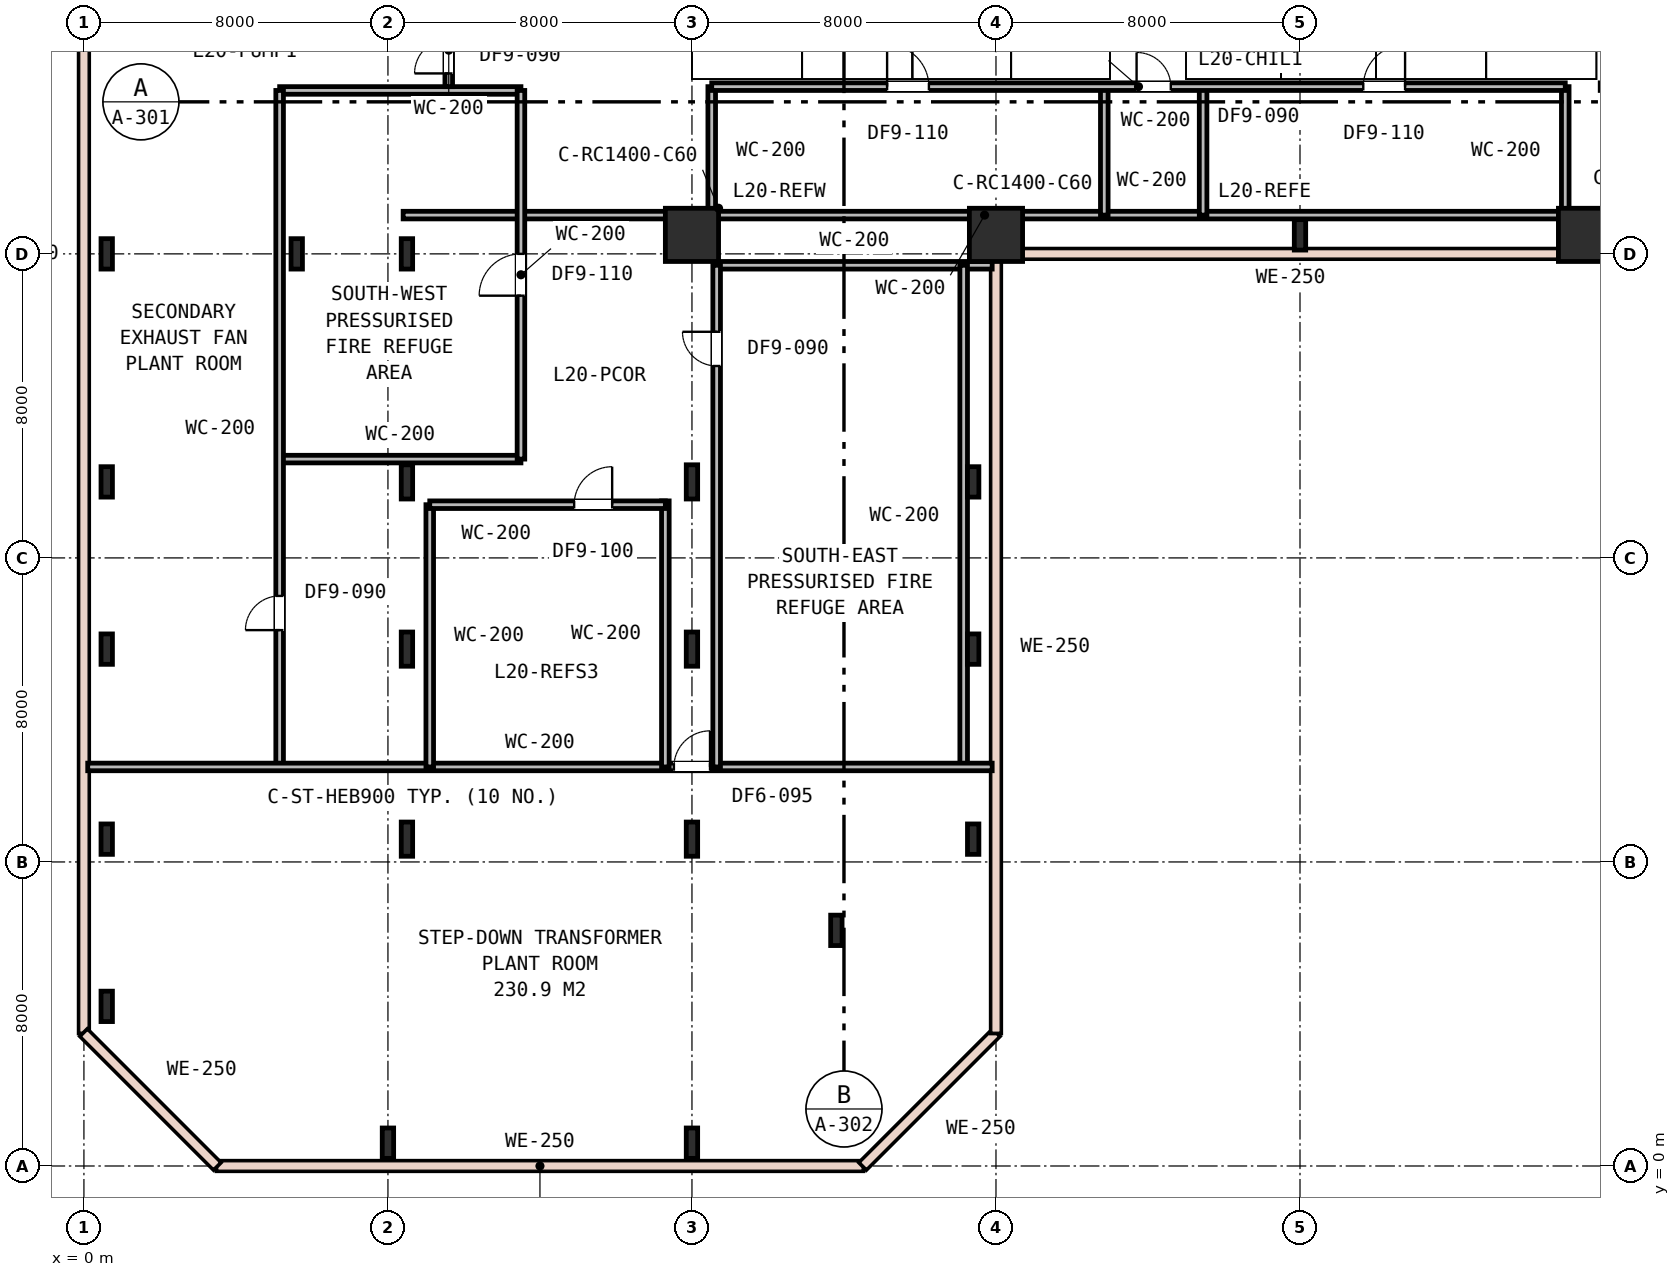
"""IFC4 building model, lengths in metres.
Left out: names, types, materials, properties, quantities, classifications, styles, units other than length and angle.
Written with IfcOpenShell. Run it as: python <this file> out.ifc"""

import sys

from ifc_helpers import new_model, si_unit, direction, frame, frame_2d, origin, origin_2d, place, context, subcontext, project, spatial, rectangle, i_section, extrude, element, fill, save


model = new_model("IFC4")
c1 = context("Model", 3, precision=1e-05, world=origin(), true_north=direction((0.0, 1.0)))
c2 = subcontext(c1, "Body", "Model", "MODEL_VIEW")
j1 = project(units=[si_unit("LENGTHUNIT", "METRE"), si_unit("PLANEANGLEUNIT", "RADIAN")], contexts=[c1])
p1 = place(None, origin())
s1 = spatial("IfcSite", under=j1, at=p1, CompositionType="ELEMENT")
p2 = place(p1, origin())
s2 = spatial("IfcBuilding", under=s1, at=p2, CompositionType="ELEMENT")
p3 = place(p2, frame((0.0, 0.0, 79.8)))
s3 = spatial("IfcBuildingStorey", under=s2, at=p3, CompositionType="ELEMENT", Elevation=79.8)
p4 = place(p3, frame((8.5, 24.0, 0.0), z_axis=(0.0, 0.0, 1.0), x_axis=(1.0, 0.0, 0.0)))
e1 = element("IfcColumn", 1, at=p4, inside=s3, PredefinedType="COLUMN", context=c2, shape_type="SweptSolid", body=[
    extrude(i_section(OverallWidth=0.3, OverallDepth=0.8, WebThickness=0.018, FlangeThickness=0.033, FilletRadius=0.03, at=origin_2d()), origin(), (0.0, 0.0, 1.0), 4.8),
])
for number, where, z_axis, x_axis in (
    (2, (16.0, 24.5, 0.0), (0.0, 0.0, 1.0), (1.0, 0.0, 0.0)),
    (3, (24.0, 24.5, 0.0), (0.0, 0.0, 1.0), (1.0, 0.0, 0.0)),
):
    element("IfcColumn", number, at=place(p3, frame(where, z_axis=z_axis, x_axis=x_axis)), inside=s3, PredefinedType="COLUMN", context=c2, shape_type="SweptSolid", body=[
        extrude(rectangle(XDim=1.4, YDim=1.4, at=origin_2d()), origin(), (0.0, 0.0, 1.0), 4.8),
    ])
p5 = place(p3, frame((32.0, 24.5, 0.0), z_axis=(0.0, 0.0, 1.0), x_axis=(1.0, 0.0, 0.0)))
e4 = element("IfcColumn", 4, at=p5, inside=s3, PredefinedType="COLUMN", context=c2, shape_type="SweptSolid", body=[
    extrude(i_section(OverallWidth=0.3, OverallDepth=0.8, WebThickness=0.018, FlangeThickness=0.033, FilletRadius=0.03, at=origin_2d()), origin(), (0.0, 0.0, 1.0), 4.8),
])
p6 = place(p3, frame((39.5, 24.5, 0.0), z_axis=(0.0, 0.0, 1.0), x_axis=(1.0, 0.0, 0.0)))
e5 = element("IfcColumn", 5, at=p6, inside=s3, PredefinedType="COLUMN", context=c2, shape_type="SweptSolid", body=[
    extrude(rectangle(XDim=1.4, YDim=1.4, at=origin_2d()), origin(), (0.0, 0.0, 1.0), 4.8),
])
for number, where, z_axis, x_axis in (
    (6, (5.6, 24.0, 0.0), (0.0, 0.0, 1.0), (1.0, 0.0, 0.0)),
    (7, (0.6, 24.0, 0.0), (0.0, 0.0, 1.0), (1.0, 0.0, 0.0)),
    (8, (0.6, 8.6, 0.0), (0.0, 0.0, 1.0), (1.0, 0.0, 0.0)),
    (9, (0.6, 13.6, 0.0), (0.0, 0.0, 1.0), (1.0, 0.0, 0.0)),
    (10, (0.6, 18.0, 0.0), (0.0, 0.0, 1.0), (1.0, 0.0, 0.0)),
    (11, (0.6, 4.2, 0.0), (0.0, 0.0, 1.0), (1.0, 0.0, 0.0)),
):
    element("IfcColumn", number, at=place(p3, frame(where, z_axis=z_axis, x_axis=x_axis)), inside=s3, PredefinedType="COLUMN", context=c2, shape_type="SweptSolid", body=[
        extrude(i_section(OverallWidth=0.3, OverallDepth=0.8, WebThickness=0.018, FlangeThickness=0.033, FilletRadius=0.03, at=origin_2d()), origin(), (0.0, 0.0, 1.0), 4.8),
    ])
for number, where, z_axis, x_axis in (
    (12, (8.0, 0.6, 0.0), (0.0, 0.0, 1.0), (1.0, 0.0, 0.0)),
    (13, (16.0, 0.6, 0.0), (0.0, 0.0, 1.0), (1.0, 0.0, 0.0)),
):
    element("IfcColumn", number, at=place(p3, frame(where, z_axis=z_axis, x_axis=x_axis)), inside=s3, PredefinedType="COLUMN", context=c2, shape_type="SweptSolid", body=[
        extrude(i_section(OverallWidth=0.3, OverallDepth=0.8, WebThickness=0.018, FlangeThickness=0.033, FilletRadius=0.03, at=origin_2d()), origin(), (0.0, 0.0, 1.0), 4.05),
    ])
for number, where, z_axis, x_axis in (
    (14, (19.8, 6.2, 0.0), (0.0, 0.0, 1.0), (1.0, 0.0, 0.0)),
    (15, (23.4, 8.6, 0.0), (0.0, 0.0, 1.0), (1.0, 0.0, 0.0)),
    (16, (23.4, 13.6, 0.0), (0.0, 0.0, 1.0), (1.0, 0.0, 0.0)),
    (17, (23.4, 18.0, 0.0), (0.0, 0.0, 1.0), (1.0, 0.0, 0.0)),
):
    element("IfcColumn", number, at=place(p3, frame(where, z_axis=z_axis, x_axis=x_axis)), inside=s3, PredefinedType="COLUMN", context=c2, shape_type="SweptSolid", body=[
        extrude(i_section(OverallWidth=0.3, OverallDepth=0.8, WebThickness=0.018, FlangeThickness=0.033, FilletRadius=0.03, at=origin_2d()), origin(), (0.0, 0.0, 1.0), 4.8),
    ])
for number, where, z_axis, x_axis in (
    (18, (8.5, 8.6, 0.0), (0.0, 0.0, 1.0), (1.0, 0.0, 0.0)),
    (19, (16.0, 8.6, 0.0), (0.0, 0.0, 1.0), (1.0, 0.0, 0.0)),
    (20, (8.5, 13.6, 0.0), (0.0, 0.0, 1.0), (1.0, 0.0, 0.0)),
    (21, (16.0, 13.6, 0.0), (0.0, 0.0, 1.0), (1.0, 0.0, 0.0)),
    (22, (8.5, 18.0, 0.0), (0.0, 0.0, 1.0), (1.0, 0.0, 0.0)),
    (23, (16.0, 18.0, 0.0), (0.0, 0.0, 1.0), (1.0, 0.0, 0.0)),
):
    element("IfcColumn", number, at=place(p3, frame(where, z_axis=z_axis, x_axis=x_axis)), inside=s3, PredefinedType="COLUMN", context=c2, shape_type="SweptSolid", body=[
        extrude(i_section(OverallWidth=0.3, OverallDepth=0.9, WebThickness=0.018, FlangeThickness=0.035, FilletRadius=0.03, at=origin_2d()), origin(), (0.0, 0.0, 1.0), 4.8),
    ])
p7 = place(p3, frame((3.5, 0.0, 0.0), z_axis=(0.0, 0.0, 1.0), x_axis=(1.0, 0.0, 0.0)))
e24 = element("IfcWall", 24, at=p7, inside=s3, PredefinedType="STANDARD", context=c2, shape_type="SweptSolid", body=[
    extrude(rectangle(XDim=17.0, YDim=0.25, at=frame_2d((8.5, 0.0))), origin(), (0.0, 0.0, 1.0), 1.15),
])
p8 = place(p3, frame((20.5, 0.0, 0.0), z_axis=(0.0, 0.0, 1.0), x_axis=(0.707106781187, 0.707106781187, 0.0)))
e25 = element("IfcWall", 25, at=p8, inside=s3, PredefinedType="STANDARD", context=c2, shape_type="SweptSolid", body=[
    extrude(rectangle(XDim=4.95, YDim=0.25, at=frame_2d((2.475, 0.0))), origin(), (0.0, 0.0, 1.0), 1.15),
])
p9 = place(p3, frame((24.0, 3.5, 0.0), z_axis=(0.0, 0.0, 1.0), x_axis=(0.0, 1.0, 0.0)))
e26 = element("IfcWall", 26, at=p9, inside=s3, PredefinedType="STANDARD", context=c2, shape_type="SweptSolid", body=[
    extrude(rectangle(XDim=20.3, YDim=0.25, at=frame_2d((10.15, 0.0))), origin(), (0.0, 0.0, 1.0), 1.15),
])
p10 = place(p3, frame((24.7, 24.0, 0.0), z_axis=(0.0, 0.0, 1.0), x_axis=(1.0, 0.0, 0.0)))
e27 = element("IfcWall", 27, at=p10, inside=s3, PredefinedType="STANDARD", context=c2, shape_type="SweptSolid", body=[
    extrude(rectangle(XDim=14.1, YDim=0.25, at=frame_2d((7.05, 0.0))), origin(), (0.0, 0.0, 1.0), 1.15),
])
p11 = place(p3, frame((0.0, 44.5, 0.0), z_axis=(0.0, 0.0, 1.0), x_axis=(0.0, -1.0, 0.0)))
e28 = element("IfcWall", 28, at=p11, inside=s3, PredefinedType="STANDARD", context=c2, shape_type="SweptSolid", body=[
    extrude(rectangle(XDim=41.0, YDim=0.25, at=frame_2d((20.5, 0.0))), origin(), (0.0, 0.0, 1.0), 1.15),
])
p12 = place(p3, frame((0.0, 3.5, 0.0), z_axis=(0.0, 0.0, 1.0), x_axis=(0.707106781187, -0.707106781187, 0.0)))
e29 = element("IfcWall", 29, at=p12, inside=s3, PredefinedType="STANDARD", context=c2, shape_type="SweptSolid", body=[
    extrude(rectangle(XDim=4.95, YDim=0.25, at=frame_2d((2.475, 0.0))), origin(), (0.0, 0.0, 1.0), 1.15),
])
p13 = place(p3, frame((8.4, 25.02, 0.0), z_axis=(0.0, 0.0, 1.0), x_axis=(1.0, 0.0, 0.0)))
e30 = element("IfcWall", 30, at=p13, inside=s3, PredefinedType="PARTITIONING", context=c2, shape_type="SweptSolid", body=[
    extrude(rectangle(XDim=30.6, YDim=0.2, at=frame_2d((15.3, 0.0))), origin(), (0.0, 0.0, 1.0), 3.94),
])
for number, where, z_axis, x_axis in (
    (31, (16.52, 25.02, 0.0), (0.0, 0.0, 1.0), (0.0, 1.0, 0.0)),
    (32, (38.98, 25.02, 0.0), (0.0, 0.0, 1.0), (0.0, 1.0, 0.0)),
):
    element("IfcWall", number, at=place(p3, frame(where, z_axis=z_axis, x_axis=x_axis)), inside=s3, PredefinedType="PARTITIONING", context=c2, shape_type="SweptSolid", body=[
        extrude(rectangle(XDim=3.38, YDim=0.2, at=frame_2d((1.69, 0.0))), origin(), (0.0, 0.0, 1.0), 3.94),
    ])
for number, where, z_axis, x_axis in (
    (33, (26.85, 25.02, 0.0), (0.0, 0.0, 1.0), (0.0, 1.0, 0.0)),
    (34, (29.45, 25.02, 0.0), (0.0, 0.0, 1.0), (0.0, 1.0, 0.0)),
):
    element("IfcWall", number, at=place(p3, frame(where, z_axis=z_axis, x_axis=x_axis)), inside=s3, PredefinedType="PARTITIONING", context=c2, shape_type="SweptSolid", body=[
        extrude(rectangle(XDim=3.38, YDim=0.2, at=frame_2d((1.69, 0.0))), origin(), (0.0, 0.0, 1.0), 4.02),
    ])
p14 = place(p3, frame((16.52, 28.4, 0.0), z_axis=(0.0, 0.0, 1.0), x_axis=(1.0, 0.0, 0.0)))
e35 = element("IfcWall", 35, at=p14, inside=s3, PredefinedType="PARTITIONING", context=c2, shape_type="SweptSolid", body=[
    extrude(rectangle(XDim=22.46, YDim=0.2, at=frame_2d((11.23, 0.0))), origin(), (0.0, 0.0, 1.0), 3.94),
])
p15 = place(p14, frame((4.615, 0.0, 0.0)))
e36 = element("IfcOpeningElement", 36, at=p15, cuts=e35, PredefinedType="OPENING", context=c2, shape_type="SweptSolid", body=[
    extrude(rectangle(XDim=1.1, YDim=2.15, at=frame_2d((0.55, 1.075))), frame((0.0, 0.11, 0.0), z_axis=(0.0, -1.0, 0.0), x_axis=(1.0, 0.0, 0.0)), (0.0, 0.0, 1.0), 0.22),
])
p16 = place(p14, frame((11.18, 0.0, 0.0)))
e37 = element("IfcOpeningElement", 37, at=p16, cuts=e35, PredefinedType="OPENING", context=c2, shape_type="SweptSolid", body=[
    extrude(rectangle(XDim=0.9, YDim=2.15, at=frame_2d((0.45, 1.075))), frame((0.0, 0.11, 0.0), z_axis=(0.0, -1.0, 0.0), x_axis=(1.0, 0.0, 0.0)), (0.0, 0.0, 1.0), 0.22),
])
p17 = place(p14, frame((17.145, 0.0, 0.0)))
e38 = element("IfcOpeningElement", 38, at=p17, cuts=e35, PredefinedType="OPENING", context=c2, shape_type="SweptSolid", body=[
    extrude(rectangle(XDim=1.1, YDim=2.15, at=frame_2d((0.55, 1.075))), frame((0.0, 0.11, 0.0), z_axis=(0.0, -1.0, 0.0), x_axis=(1.0, 0.0, 0.0)), (0.0, 0.0, 1.0), 0.22),
])
for number, where, z_axis, x_axis in (
    (39, (5.15, 28.3, 0.0), (0.0, 0.0, 1.0), (1.0, 0.0, 0.0)),
    (40, (5.15, 18.6, 0.0), (0.0, 0.0, 1.0), (1.0, 0.0, 0.0)),
):
    element("IfcWall", number, at=place(p3, frame(where, z_axis=z_axis, x_axis=x_axis)), inside=s3, PredefinedType="PARTITIONING", context=c2, shape_type="SweptSolid", body=[
        extrude(rectangle(XDim=6.35, YDim=0.2, at=frame_2d((3.175, 0.0))), origin(), (0.0, 0.0, 1.0), 3.94),
    ])
p18 = place(p3, frame((5.15, 10.5, 0.0), z_axis=(0.0, 0.0, 1.0), x_axis=(0.0, 1.0, 0.0)))
e41 = element("IfcWall", 41, at=p18, inside=s3, PredefinedType="PARTITIONING", context=c2, shape_type="SweptSolid", body=[
    extrude(rectangle(XDim=17.8, YDim=0.2, at=frame_2d((8.9, 0.0))), origin(), (0.0, 0.0, 1.0), 3.94),
])
p19 = place(p18, frame((3.6, 0.0, 0.0)))
e42 = element("IfcOpeningElement", 42, at=p19, cuts=e41, PredefinedType="OPENING", context=c2, shape_type="SweptSolid", body=[
    extrude(rectangle(XDim=0.9, YDim=2.15, at=frame_2d((0.45, 1.075))), frame((0.0, 0.11, 0.0), z_axis=(0.0, -1.0, 0.0), x_axis=(1.0, 0.0, 0.0)), (0.0, 0.0, 1.0), 0.22),
])
p20 = place(p3, frame((11.5, 18.6, 0.0), z_axis=(0.0, 0.0, 1.0), x_axis=(0.0, 1.0, 0.0)))
e43 = element("IfcWall", 43, at=p20, inside=s3, PredefinedType="PARTITIONING", context=c2, shape_type="SweptSolid", body=[
    extrude(rectangle(XDim=9.7, YDim=0.2, at=frame_2d((4.85, 0.0))), origin(), (0.0, 0.0, 1.0), 3.94),
])
p21 = place(p20, frame((4.3, 0.0, 0.0)))
e44 = element("IfcOpeningElement", 44, at=p21, cuts=e43, PredefinedType="OPENING", context=c2, shape_type="SweptSolid", body=[
    extrude(rectangle(XDim=1.1, YDim=2.15, at=frame_2d((0.55, 1.075))), frame((0.0, 0.11, 0.0), z_axis=(0.0, -1.0, 0.0), x_axis=(1.0, 0.0, 0.0)), (0.0, 0.0, 1.0), 0.22),
])
p22 = place(p3, frame((16.65, 23.7, 0.0), z_axis=(0.0, 0.0, 1.0), x_axis=(1.0, 0.0, 0.0)))
e45 = element("IfcWall", 45, at=p22, inside=s3, PredefinedType="PARTITIONING", context=c2, shape_type="SweptSolid", body=[
    extrude(rectangle(XDim=7.25, YDim=0.2, at=frame_2d((3.625, 0.0))), origin(), (0.0, 0.0, 1.0), 4.02),
])
p23 = place(p3, frame((23.15, 10.5, 0.0), z_axis=(0.0, 0.0, 1.0), x_axis=(0.0, 1.0, 0.0)))
e46 = element("IfcWall", 46, at=p23, inside=s3, PredefinedType="PARTITIONING", context=c2, shape_type="SweptSolid", body=[
    extrude(rectangle(XDim=13.2, YDim=0.2, at=frame_2d((6.6, 0.0))), origin(), (0.0, 0.0, 1.0), 3.94),
])
p24 = place(p3, frame((0.1, 10.5, 0.0), z_axis=(0.0, 0.0, 1.0), x_axis=(1.0, 0.0, 0.0)))
e47 = element("IfcWall", 47, at=p24, inside=s3, PredefinedType="PARTITIONING", context=c2, shape_type="SweptSolid", body=[
    extrude(rectangle(XDim=23.8, YDim=0.2, at=frame_2d((11.9, 0.0))), origin(), (0.0, 0.0, 1.0), 3.94),
])
p25 = place(p24, frame((15.425, 0.0, 0.0)))
e48 = element("IfcOpeningElement", 48, at=p25, cuts=e47, PredefinedType="OPENING", context=c2, shape_type="SweptSolid", body=[
    extrude(rectangle(XDim=0.95, YDim=2.15, at=frame_2d((0.475, 1.075))), frame((0.0, 0.11, 0.0), z_axis=(0.0, -1.0, 0.0), x_axis=(1.0, 0.0, 0.0)), (0.0, 0.0, 1.0), 0.22),
])
p26 = place(p3, frame((16.65, 10.5, 0.0), z_axis=(0.0, 0.0, 1.0), x_axis=(0.0, 1.0, 0.0)))
e49 = element("IfcWall", 49, at=p26, inside=s3, PredefinedType="PARTITIONING", context=c2, shape_type="SweptSolid", body=[
    extrude(rectangle(XDim=13.2, YDim=0.2, at=frame_2d((6.6, 0.0))), origin(), (0.0, 0.0, 1.0), 3.94),
])
p27 = place(p26, frame((10.55, 0.0, 0.0)))
e50 = element("IfcOpeningElement", 50, at=p27, cuts=e49, PredefinedType="OPENING", context=c2, shape_type="SweptSolid", body=[
    extrude(rectangle(XDim=0.9, YDim=2.15, at=frame_2d((0.45, 1.075))), frame((0.0, 0.11, 0.0), z_axis=(0.0, -1.0, 0.0), x_axis=(1.0, 0.0, 0.0)), (0.0, 0.0, 1.0), 0.22),
])
p28 = place(p3, frame((9.1, 10.5, 0.0), z_axis=(0.0, 0.0, 1.0), x_axis=(0.0, 1.0, 0.0)))
e51 = element("IfcWall", 51, at=p28, inside=s3, PredefinedType="PARTITIONING", context=c2, shape_type="SweptSolid", body=[
    extrude(rectangle(XDim=6.9, YDim=0.2, at=frame_2d((3.45, 0.0))), origin(), (0.0, 0.0, 1.0), 3.94),
])
p29 = place(p3, frame((15.3, 10.5, 0.0), z_axis=(0.0, 0.0, 1.0), x_axis=(0.0, 1.0, 0.0)))
e52 = element("IfcWall", 52, at=p29, inside=s3, PredefinedType="PARTITIONING", context=c2, shape_type="SweptSolid", body=[
    extrude(rectangle(XDim=7.0, YDim=0.2, at=frame_2d((3.5, 0.0))), origin(), (0.0, 0.0, 1.0), 3.94),
])
p30 = place(p3, frame((9.1, 17.4, 0.0), z_axis=(0.0, 0.0, 1.0), x_axis=(1.0, 0.0, 0.0)))
e53 = element("IfcWall", 53, at=p30, inside=s3, PredefinedType="PARTITIONING", context=c2, shape_type="SweptSolid", body=[
    extrude(rectangle(XDim=6.2, YDim=0.2, at=frame_2d((3.1, 0.0))), origin(), (0.0, 0.0, 1.0), 4.02),
])
p31 = place(p30, frame((3.8, 0.0, 0.0)))
e54 = element("IfcOpeningElement", 54, at=p31, cuts=e53, PredefinedType="OPENING", context=c2, shape_type="SweptSolid", body=[
    extrude(rectangle(XDim=1.0, YDim=2.15, at=frame_2d((0.5, 1.075))), frame((0.0, 0.11, 0.0), z_axis=(0.0, -1.0, 0.0), x_axis=(1.0, 0.0, 0.0)), (0.0, 0.0, 1.0), 0.22),
])
p32 = place(p3, frame((9.6, 28.4, 0.0), z_axis=(0.0, 0.0, 1.0), x_axis=(0.0, 1.0, 0.0)))
e55 = element("IfcWall", 55, at=p32, inside=s3, PredefinedType="PARTITIONING", context=c2, shape_type="SweptSolid", body=[
    extrude(rectangle(XDim=1.92, YDim=0.2, at=frame_2d((0.96, 0.0))), origin(), (0.0, 0.0, 1.0), 3.94),
])
p33 = place(p32, frame((0.348, 0.0, 0.0)))
e56 = element("IfcOpeningElement", 56, at=p33, cuts=e55, PredefinedType="OPENING", context=c2, shape_type="SweptSolid", body=[
    extrude(rectangle(XDim=0.9, YDim=2.15, at=frame_2d((0.45, 1.075))), frame((0.0, 0.11, 0.0), z_axis=(0.0, -1.0, 0.0), x_axis=(1.0, 0.0, 0.0)), (0.0, 0.0, 1.0), 0.22),
])
p34 = place(p15, origin())
e57 = element("IfcDoor", 57, at=p34, inside=s3, OperationType="SINGLE_SWING_LEFT", PredefinedType="DOOR", context=c2, shape_type="SweptSolid", body=[
    extrude(rectangle(XDim=1.1, YDim=2.15, at=frame_2d((0.55, 1.075))), frame((0.0, 0.025, 0.0), z_axis=(0.0, -1.0, 0.0), x_axis=(1.0, 0.0, 0.0)), (0.0, 0.0, 1.0), 0.05),
])
fill(e36, e57)
p35 = place(p16, origin())
e58 = element("IfcDoor", 58, at=p35, inside=s3, OperationType="SINGLE_SWING_LEFT", PredefinedType="DOOR", context=c2, shape_type="SweptSolid", body=[
    extrude(rectangle(XDim=0.9, YDim=2.15, at=frame_2d((0.45, 1.075))), frame((0.0, 0.025, 0.0), z_axis=(0.0, -1.0, 0.0), x_axis=(1.0, 0.0, 0.0)), (0.0, 0.0, 1.0), 0.05),
])
fill(e37, e58)
p36 = place(p17, origin())
e59 = element("IfcDoor", 59, at=p36, inside=s3, OperationType="SINGLE_SWING_RIGHT", PredefinedType="DOOR", context=c2, shape_type="SweptSolid", body=[
    extrude(rectangle(XDim=1.1, YDim=2.15, at=frame_2d((0.55, 1.075))), frame((0.0, 0.025, 0.0), z_axis=(0.0, -1.0, 0.0), x_axis=(1.0, 0.0, 0.0)), (0.0, 0.0, 1.0), 0.05),
])
fill(e38, e59)
p37 = place(p21, origin())
e60 = element("IfcDoor", 60, at=p37, inside=s3, OperationType="SINGLE_SWING_LEFT", PredefinedType="DOOR", context=c2, shape_type="SweptSolid", body=[
    extrude(rectangle(XDim=1.1, YDim=2.15, at=frame_2d((0.55, 1.075))), frame((0.0, 0.025, 0.0), z_axis=(0.0, -1.0, 0.0), x_axis=(1.0, 0.0, 0.0)), (0.0, 0.0, 1.0), 0.05),
])
fill(e44, e60)
p38 = place(p27, origin())
e61 = element("IfcDoor", 61, at=p38, inside=s3, OperationType="SINGLE_SWING_RIGHT", PredefinedType="DOOR", context=c2, shape_type="SweptSolid", body=[
    extrude(rectangle(XDim=0.9, YDim=2.15, at=frame_2d((0.45, 1.075))), frame((0.0, 0.025, 0.0), z_axis=(0.0, -1.0, 0.0), x_axis=(1.0, 0.0, 0.0)), (0.0, 0.0, 1.0), 0.05),
])
fill(e50, e61)
p39 = place(p31, origin())
e62 = element("IfcDoor", 62, at=p39, inside=s3, OperationType="SINGLE_SWING_RIGHT", PredefinedType="DOOR", context=c2, shape_type="SweptSolid", body=[
    extrude(rectangle(XDim=1.0, YDim=2.15, at=frame_2d((0.5, 1.075))), frame((0.0, 0.025, 0.0), z_axis=(0.0, -1.0, 0.0), x_axis=(1.0, 0.0, 0.0)), (0.0, 0.0, 1.0), 0.05),
])
fill(e54, e62)
p40 = place(p33, origin())
e63 = element("IfcDoor", 63, at=p40, inside=s3, OperationType="SINGLE_SWING_LEFT", PredefinedType="DOOR", context=c2, shape_type="SweptSolid", body=[
    extrude(rectangle(XDim=0.9, YDim=2.15, at=frame_2d((0.45, 1.075))), frame((0.0, 0.025, 0.0), z_axis=(0.0, -1.0, 0.0), x_axis=(1.0, 0.0, 0.0)), (0.0, 0.0, 1.0), 0.05),
])
fill(e56, e63)
p41 = place(p19, origin())
e64 = element("IfcDoor", 64, at=p41, inside=s3, OperationType="SINGLE_SWING_LEFT", PredefinedType="DOOR", context=c2, shape_type="SweptSolid", body=[
    extrude(rectangle(XDim=0.9, YDim=2.15, at=frame_2d((0.45, 1.075))), frame((0.0, 0.025, 0.0), z_axis=(0.0, -1.0, 0.0), x_axis=(1.0, 0.0, 0.0)), (0.0, 0.0, 1.0), 0.05),
])
fill(e42, e64)
p42 = place(p25, origin())
e65 = element("IfcDoor", 65, at=p42, inside=s3, OperationType="SINGLE_SWING_RIGHT", PredefinedType="DOOR", context=c2, shape_type="SweptSolid", body=[
    extrude(rectangle(XDim=0.95, YDim=2.15, at=frame_2d((0.475, 1.075))), frame((0.0, 0.025, 0.0), z_axis=(0.0, -1.0, 0.0), x_axis=(1.0, 0.0, 0.0)), (0.0, 0.0, 1.0), 0.05),
])
fill(e48, e65)
save(model, sys.argv[1])
